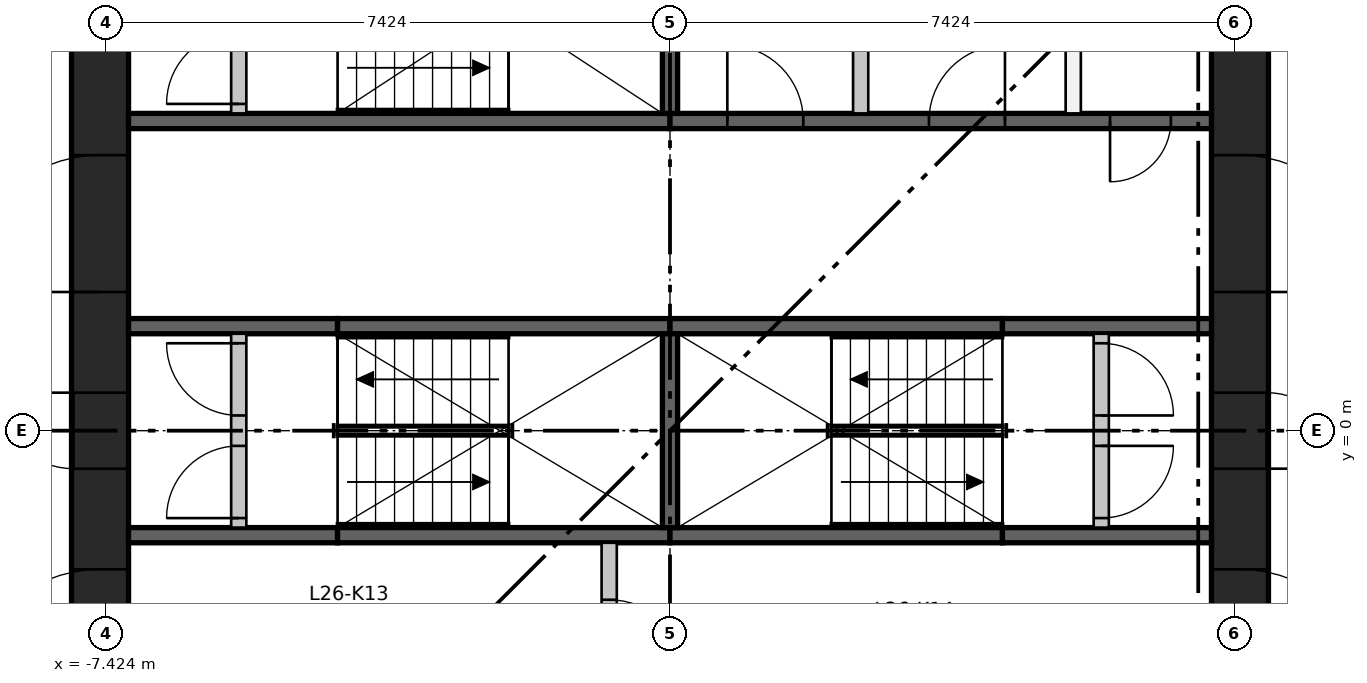
"""IFC4 building model, lengths in metres.
Left out: names, types, materials, properties, quantities, classifications, styles, units other than length and angle.
Written with IfcOpenShell. Run it as: python <this file> out.ifc"""

import sys

from ifc_helpers import new_model, si_unit, direction, frame, frame_2d, origin, place, context, subcontext, project, spatial, rectangle, extrude, element, fill, save


model = new_model("IFC4")
c1 = context("Model", 3, precision=1e-05, world=origin(), true_north=direction((0.0, 1.0)))
c2 = subcontext(c1, "Body", "Model", "MODEL_VIEW")
j1 = project(units=[si_unit("LENGTHUNIT", "METRE"), si_unit("PLANEANGLEUNIT", "RADIAN")], contexts=[c1])
p1 = place(None, origin())
s1 = spatial("IfcSite", under=j1, at=p1, CompositionType="ELEMENT")
p2 = place(p1, origin())
s2 = spatial("IfcBuilding", under=s1, at=p2, CompositionType="ELEMENT")
p3 = place(p2, frame((0.0, 0.0, 101.95)))
s3 = spatial("IfcBuildingStorey", under=s2, at=p3, CompositionType="ELEMENT", Elevation=101.95)
p4 = place(p3, frame((-7.499, -7.124, 0.0), z_axis=(0.0, 0.0, 1.0), x_axis=(0.0, 1.0, 0.0)))
e1 = element("IfcWall", 1, at=p4, inside=s3, PredefinedType="SHEAR", context=c2, shape_type="SweptSolid", body=[
    extrude(rectangle(XDim=14.248, YDim=0.75, at=frame_2d((7.124, 0.0))), origin(), (0.0, 0.0, 1.0), 3.65),
])
p5 = place(p4, frame((6.624, 0.0, 0.0)))
e2 = element("IfcOpeningElement", 2, at=p5, cuts=e1, PredefinedType="OPENING", context=c2, shape_type="SweptSolid", body=[
    extrude(rectangle(XDim=1.0, YDim=2.1, at=frame_2d((0.5, 1.05))), frame((0.0, 0.385, 0.0), z_axis=(0.0, -1.0, 0.0), x_axis=(1.0, 0.0, 0.0)), (0.0, 0.0, 1.0), 0.77),
])
p6 = place(p4, frame((3.5, 0.0, 0.0)))
e3 = element("IfcOpeningElement", 3, at=p6, cuts=e1, PredefinedType="OPENING", context=c2, shape_type="SweptSolid", body=[
    extrude(rectangle(XDim=1.8, YDim=2.1, at=frame_2d((0.9, 1.05))), frame((0.0, 0.385, 0.0), z_axis=(0.0, -1.0, 0.0), x_axis=(1.0, 0.0, 0.0)), (0.0, 0.0, 1.0), 0.77),
])
p7 = place(p4, frame((8.948, 0.0, 0.0)))
e4 = element("IfcOpeningElement", 4, at=p7, cuts=e1, PredefinedType="OPENING", context=c2, shape_type="SweptSolid", body=[
    extrude(rectangle(XDim=1.8, YDim=2.1, at=frame_2d((0.9, 1.05))), frame((0.0, 0.385, 0.0), z_axis=(0.0, -1.0, 0.0), x_axis=(1.0, 0.0, 0.0)), (0.0, 0.0, 1.0), 0.77),
])
p8 = place(p4, frame((12.124, 0.0, 0.0)))
e5 = element("IfcOpeningElement", 5, at=p8, cuts=e1, PredefinedType="OPENING", context=c2, shape_type="SweptSolid", body=[
    extrude(rectangle(XDim=1.0, YDim=2.1, at=frame_2d((0.5, 1.05))), frame((0.0, 0.385, 0.0), z_axis=(0.0, -1.0, 0.0), x_axis=(1.0, 0.0, 0.0)), (0.0, 0.0, 1.0), 0.77),
])
p9 = place(p3, frame((7.499, -7.124, 0.0), z_axis=(0.0, 0.0, 1.0), x_axis=(0.0, 1.0, 0.0)))
e6 = element("IfcWall", 6, at=p9, inside=s3, PredefinedType="SHEAR", context=c2, shape_type="SweptSolid", body=[
    extrude(rectangle(XDim=14.248, YDim=0.75, at=frame_2d((7.124, 0.0))), origin(), (0.0, 0.0, 1.0), 3.65),
])
p10 = place(p9, frame((6.624, 0.0, 0.0)))
e7 = element("IfcOpeningElement", 7, at=p10, cuts=e6, PredefinedType="OPENING", context=c2, shape_type="SweptSolid", body=[
    extrude(rectangle(XDim=1.0, YDim=2.1, at=frame_2d((0.5, 1.05))), frame((0.0, 0.385, 0.0), z_axis=(0.0, -1.0, 0.0), x_axis=(1.0, 0.0, 0.0)), (0.0, 0.0, 1.0), 0.77),
])
p11 = place(p9, frame((3.5, 0.0, 0.0)))
e8 = element("IfcOpeningElement", 8, at=p11, cuts=e6, PredefinedType="OPENING", context=c2, shape_type="SweptSolid", body=[
    extrude(rectangle(XDim=1.8, YDim=2.1, at=frame_2d((0.9, 1.05))), frame((0.0, 0.385, 0.0), z_axis=(0.0, -1.0, 0.0), x_axis=(1.0, 0.0, 0.0)), (0.0, 0.0, 1.0), 0.77),
])
p12 = place(p9, frame((8.948, 0.0, 0.0)))
e9 = element("IfcOpeningElement", 9, at=p12, cuts=e6, PredefinedType="OPENING", context=c2, shape_type="SweptSolid", body=[
    extrude(rectangle(XDim=1.8, YDim=2.1, at=frame_2d((0.9, 1.05))), frame((0.0, 0.385, 0.0), z_axis=(0.0, -1.0, 0.0), x_axis=(1.0, 0.0, 0.0)), (0.0, 0.0, 1.0), 0.77),
])
p13 = place(p3, frame((-7.124, 4.074, 0.0), z_axis=(0.0, 0.0, 1.0), x_axis=(1.0, 0.0, 0.0)))
e10 = element("IfcWall", 10, at=p13, inside=s3, PredefinedType="SHEAR", context=c2, shape_type="SweptSolid", body=[
    extrude(rectangle(XDim=7.124, YDim=0.2, at=frame_2d((3.562, 0.0))), origin(), (0.0, 0.0, 1.0), 3.3),
])
p14 = place(p3, frame((0.0, 4.074, 0.0), z_axis=(0.0, 0.0, 1.0), x_axis=(1.0, 0.0, 0.0)))
e11 = element("IfcWall", 11, at=p14, inside=s3, PredefinedType="SHEAR", context=c2, shape_type="SweptSolid", body=[
    extrude(rectangle(XDim=7.124, YDim=0.2, at=frame_2d((3.562, 0.0))), origin(), (0.0, 0.0, 1.0), 3.3),
])
p15 = place(p14, frame((0.754, 0.0, 0.0)))
e12 = element("IfcOpeningElement", 12, at=p15, cuts=e11, PredefinedType="OPENING", context=c2, shape_type="SweptSolid", body=[
    extrude(rectangle(XDim=1.0, YDim=2.1, at=frame_2d((0.5, 1.05))), frame((0.0, 0.11, 0.0), z_axis=(0.0, -1.0, 0.0), x_axis=(1.0, 0.0, 0.0)), (0.0, 0.0, 1.0), 0.22),
])
p16 = place(p14, frame((3.407, 0.0, 0.0)))
e13 = element("IfcOpeningElement", 13, at=p16, cuts=e11, PredefinedType="OPENING", context=c2, shape_type="SweptSolid", body=[
    extrude(rectangle(XDim=1.0, YDim=2.1, at=frame_2d((0.5, 1.05))), frame((0.0, 0.11, 0.0), z_axis=(0.0, -1.0, 0.0), x_axis=(1.0, 0.0, 0.0)), (0.0, 0.0, 1.0), 0.22),
])
p17 = place(p14, frame((5.79, 0.0, 0.0)))
e14 = element("IfcOpeningElement", 14, at=p17, cuts=e11, PredefinedType="OPENING", context=c2, shape_type="SweptSolid", body=[
    extrude(rectangle(XDim=0.8, YDim=2.1, at=frame_2d((0.4, 1.05))), frame((0.0, 0.11, 0.0), z_axis=(0.0, -1.0, 0.0), x_axis=(1.0, 0.0, 0.0)), (0.0, 0.0, 1.0), 0.22),
])
p18 = place(p3, frame((-7.124, -1.375, 0.0), z_axis=(0.0, 0.0, 1.0), x_axis=(1.0, 0.0, 0.0)))
e15 = element("IfcWall", 15, at=p18, inside=s3, PredefinedType="SHEAR", context=c2, shape_type="SweptSolid", body=[
    extrude(rectangle(XDim=2.75, YDim=0.2, at=frame_2d((1.375, 0.0))), origin(), (0.0, 0.0, 1.0), 3.3),
])
for number, where, z_axis, x_axis in (
    (16, (-4.374, -1.375, 0.0), (0.0, 0.0, 1.0), (1.0, 0.0, 0.0)),
    (17, (0.0, -1.375, 0.0), (0.0, 0.0, 1.0), (1.0, 0.0, 0.0)),
):
    element("IfcWall", number, at=place(p3, frame(where, z_axis=z_axis, x_axis=x_axis)), inside=s3, PredefinedType="SHEAR", context=c2, shape_type="SweptSolid", body=[
        extrude(rectangle(XDim=4.374, YDim=0.2, at=frame_2d((2.187, 0.0))), origin(), (0.0, 0.0, 1.0), 3.3),
    ])
for number, where, z_axis, x_axis in (
    (18, (4.374, -1.375, 0.0), (0.0, 0.0, 1.0), (1.0, 0.0, 0.0)),
    (19, (-7.124, 1.375, 0.0), (0.0, 0.0, 1.0), (1.0, 0.0, 0.0)),
):
    element("IfcWall", number, at=place(p3, frame(where, z_axis=z_axis, x_axis=x_axis)), inside=s3, PredefinedType="SHEAR", context=c2, shape_type="SweptSolid", body=[
        extrude(rectangle(XDim=2.75, YDim=0.2, at=frame_2d((1.375, 0.0))), origin(), (0.0, 0.0, 1.0), 3.3),
    ])
for number, where, z_axis, x_axis in (
    (20, (-4.374, 1.375, 0.0), (0.0, 0.0, 1.0), (1.0, 0.0, 0.0)),
    (21, (0.0, 1.375, 0.0), (0.0, 0.0, 1.0), (1.0, 0.0, 0.0)),
):
    element("IfcWall", number, at=place(p3, frame(where, z_axis=z_axis, x_axis=x_axis)), inside=s3, PredefinedType="SHEAR", context=c2, shape_type="SweptSolid", body=[
        extrude(rectangle(XDim=4.374, YDim=0.2, at=frame_2d((2.187, 0.0))), origin(), (0.0, 0.0, 1.0), 3.3),
    ])
p19 = place(p3, frame((4.374, 1.375, 0.0), z_axis=(0.0, 0.0, 1.0), x_axis=(1.0, 0.0, 0.0)))
e22 = element("IfcWall", 22, at=p19, inside=s3, PredefinedType="SHEAR", context=c2, shape_type="SweptSolid", body=[
    extrude(rectangle(XDim=2.75, YDim=0.2, at=frame_2d((1.375, 0.0))), origin(), (0.0, 0.0, 1.0), 3.3),
])
p20 = place(p3, frame((0.0, -1.275, 0.0), z_axis=(0.0, 0.0, 1.0), x_axis=(0.0, 1.0, 0.0)))
e23 = element("IfcWall", 23, at=p20, inside=s3, PredefinedType="SHEAR", context=c2, shape_type="SweptSolid", body=[
    extrude(rectangle(XDim=2.55, YDim=0.2, at=frame_2d((1.275, 0.0))), origin(), (0.0, 0.0, 1.0), 3.3),
])
p21 = place(p3, frame((-0.8, -3.974, 0.0), z_axis=(0.0, 0.0, 1.0), x_axis=(0.0, 1.0, 0.0)))
e24 = element("IfcWall", 24, at=p21, inside=s3, PredefinedType="PARTITIONING", context=c2, shape_type="SweptSolid", body=[
    extrude(rectangle(XDim=2.499, YDim=0.2, at=frame_2d((1.25, 0.0))), origin(), (0.0, 0.0, 1.0), 3.3),
])
p22 = place(p21, frame((0.75, 0.0, 0.0)))
e25 = element("IfcOpeningElement", 25, at=p22, cuts=e24, PredefinedType="OPENING", context=c2, shape_type="SweptSolid", body=[
    extrude(rectangle(XDim=1.0, YDim=2.1, at=frame_2d((0.5, 1.05))), frame((0.0, 0.11, 0.0), z_axis=(0.0, -1.0, 0.0), x_axis=(1.0, 0.0, 0.0)), (0.0, 0.0, 1.0), 0.22),
])
p23 = place(p3, frame((0.0, 4.174, 0.0), z_axis=(0.0, 0.0, 1.0), x_axis=(0.0, 1.0, 0.0)))
e26 = element("IfcWall", 26, at=p23, inside=s3, PredefinedType="SHEAR", context=c2, shape_type="SweptSolid", body=[
    extrude(rectangle(XDim=1.4, YDim=0.2, at=frame_2d((0.7, 0.0))), origin(), (0.0, 0.0, 1.0), 3.3),
])
for number, where, z_axis, x_axis in (
    (27, (2.509, 4.174, 0.0), (0.0, 0.0, 1.0), (0.0, 1.0, 0.0)),
    (28, (5.305, 4.174, 0.0), (0.0, 0.0, 1.0), (0.0, 1.0, 0.0)),
):
    element("IfcWall", number, at=place(p3, frame(where, z_axis=z_axis, x_axis=x_axis)), inside=s3, PredefinedType="PARTITIONING", context=c2, shape_type="SweptSolid", body=[
        extrude(rectangle(XDim=2.95, YDim=0.2, at=frame_2d((1.475, 0.0))), origin(), (0.0, 0.0, 1.0), 3.3),
    ])
p24 = place(p3, frame((-5.674, -1.275, 0.0), z_axis=(0.0, 0.0, 1.0), x_axis=(0.0, 1.0, 0.0)))
e29 = element("IfcWall", 29, at=p24, inside=s3, PredefinedType="PARTITIONING", context=c2, shape_type="SweptSolid", body=[
    extrude(rectangle(XDim=2.55, YDim=0.2, at=frame_2d((1.275, 0.0))), origin(), (0.0, 0.0, 1.0), 3.3),
])
p25 = place(p24, frame((0.125, 0.0, 0.0)))
e30 = element("IfcOpeningElement", 30, at=p25, cuts=e29, PredefinedType="OPENING", context=c2, shape_type="SweptSolid", body=[
    extrude(rectangle(XDim=0.95, YDim=2.1, at=frame_2d((0.475, 1.05))), frame((0.0, 0.11, 0.0), z_axis=(0.0, -1.0, 0.0), x_axis=(1.0, 0.0, 0.0)), (0.0, 0.0, 1.0), 0.22),
])
p26 = place(p24, frame((1.475, 0.0, 0.0)))
e31 = element("IfcOpeningElement", 31, at=p26, cuts=e29, PredefinedType="OPENING", context=c2, shape_type="SweptSolid", body=[
    extrude(rectangle(XDim=0.95, YDim=2.1, at=frame_2d((0.475, 1.05))), frame((0.0, 0.11, 0.0), z_axis=(0.0, -1.0, 0.0), x_axis=(1.0, 0.0, 0.0)), (0.0, 0.0, 1.0), 0.22),
])
p27 = place(p3, frame((5.674, -1.275, 0.0), z_axis=(0.0, 0.0, 1.0), x_axis=(0.0, 1.0, 0.0)))
e32 = element("IfcWall", 32, at=p27, inside=s3, PredefinedType="PARTITIONING", context=c2, shape_type="SweptSolid", body=[
    extrude(rectangle(XDim=2.55, YDim=0.2, at=frame_2d((1.275, 0.0))), origin(), (0.0, 0.0, 1.0), 3.3),
])
p28 = place(p27, frame((0.125, 0.0, 0.0)))
e33 = element("IfcOpeningElement", 33, at=p28, cuts=e32, PredefinedType="OPENING", context=c2, shape_type="SweptSolid", body=[
    extrude(rectangle(XDim=0.95, YDim=2.1, at=frame_2d((0.475, 1.05))), frame((0.0, 0.11, 0.0), z_axis=(0.0, -1.0, 0.0), x_axis=(1.0, 0.0, 0.0)), (0.0, 0.0, 1.0), 0.22),
])
p29 = place(p27, frame((1.475, 0.0, 0.0)))
e34 = element("IfcOpeningElement", 34, at=p29, cuts=e32, PredefinedType="OPENING", context=c2, shape_type="SweptSolid", body=[
    extrude(rectangle(XDim=0.95, YDim=2.1, at=frame_2d((0.475, 1.05))), frame((0.0, 0.11, 0.0), z_axis=(0.0, -1.0, 0.0), x_axis=(1.0, 0.0, 0.0)), (0.0, 0.0, 1.0), 0.22),
])
p30 = place(p3, frame((-5.674, 4.174, 0.0), z_axis=(0.0, 0.0, 1.0), x_axis=(0.0, 1.0, 0.0)))
e35 = element("IfcWall", 35, at=p30, inside=s3, PredefinedType="PARTITIONING", context=c2, shape_type="SweptSolid", body=[
    extrude(rectangle(XDim=2.95, YDim=0.2, at=frame_2d((1.475, 0.0))), origin(), (0.0, 0.0, 1.0), 3.3),
])
p31 = place(p30, frame((0.125, 0.0, 0.0)))
e36 = element("IfcOpeningElement", 36, at=p31, cuts=e35, PredefinedType="OPENING", context=c2, shape_type="SweptSolid", body=[
    extrude(rectangle(XDim=0.95, YDim=2.1, at=frame_2d((0.475, 1.05))), frame((0.0, 0.11, 0.0), z_axis=(0.0, -1.0, 0.0), x_axis=(1.0, 0.0, 0.0)), (0.0, 0.0, 1.0), 0.22),
])
p32 = place(p30, frame((1.725, 0.0, 0.0)))
e37 = element("IfcOpeningElement", 37, at=p32, cuts=e35, PredefinedType="OPENING", context=c2, shape_type="SweptSolid", body=[
    extrude(rectangle(XDim=0.95, YDim=2.1, at=frame_2d((0.475, 1.05))), frame((0.0, 0.11, 0.0), z_axis=(0.0, -1.0, 0.0), x_axis=(1.0, 0.0, 0.0)), (0.0, 0.0, 1.0), 0.22),
])
p33 = place(p25, origin())
e38 = element("IfcDoor", 38, at=p33, inside=s3, OperationType="SINGLE_SWING_LEFT", PredefinedType="DOOR", context=c2, shape_type="SweptSolid", body=[
    extrude(rectangle(XDim=0.95, YDim=2.1, at=frame_2d((0.475, 1.05))), frame((0.0, 0.025, 0.0), z_axis=(0.0, -1.0, 0.0), x_axis=(1.0, 0.0, 0.0)), (0.0, 0.0, 1.0), 0.05),
])
fill(e30, e38)
p34 = place(p26, origin())
e39 = element("IfcDoor", 39, at=p34, inside=s3, OperationType="SINGLE_SWING_RIGHT", PredefinedType="DOOR", context=c2, shape_type="SweptSolid", body=[
    extrude(rectangle(XDim=0.95, YDim=2.1, at=frame_2d((0.475, 1.05))), frame((0.0, 0.025, 0.0), z_axis=(0.0, -1.0, 0.0), x_axis=(1.0, 0.0, 0.0)), (0.0, 0.0, 1.0), 0.05),
])
fill(e31, e39)
p35 = place(p28, frame((0.95, 0.0, 0.0), z_axis=(0.0, 0.0, 1.0), x_axis=(-1.0, 0.0, 0.0)))
e40 = element("IfcDoor", 40, at=p35, inside=s3, OperationType="SINGLE_SWING_RIGHT", PredefinedType="DOOR", context=c2, shape_type="SweptSolid", body=[
    extrude(rectangle(XDim=0.95, YDim=2.1, at=frame_2d((0.475, 1.05))), frame((0.0, 0.025, 0.0), z_axis=(0.0, -1.0, 0.0), x_axis=(1.0, 0.0, 0.0)), (0.0, 0.0, 1.0), 0.05),
])
fill(e33, e40)
p36 = place(p29, frame((0.95, 0.0, 0.0), z_axis=(0.0, 0.0, 1.0), x_axis=(-1.0, 0.0, 0.0)))
e41 = element("IfcDoor", 41, at=p36, inside=s3, OperationType="SINGLE_SWING_LEFT", PredefinedType="DOOR", context=c2, shape_type="SweptSolid", body=[
    extrude(rectangle(XDim=0.95, YDim=2.1, at=frame_2d((0.475, 1.05))), frame((0.0, 0.025, 0.0), z_axis=(0.0, -1.0, 0.0), x_axis=(1.0, 0.0, 0.0)), (0.0, 0.0, 1.0), 0.05),
])
fill(e34, e41)
p37 = place(p31, origin())
e42 = element("IfcDoor", 42, at=p37, inside=s3, OperationType="SINGLE_SWING_LEFT", PredefinedType="DOOR", context=c2, shape_type="SweptSolid", body=[
    extrude(rectangle(XDim=0.95, YDim=2.1, at=frame_2d((0.475, 1.05))), frame((0.0, 0.025, 0.0), z_axis=(0.0, -1.0, 0.0), x_axis=(1.0, 0.0, 0.0)), (0.0, 0.0, 1.0), 0.05),
])
fill(e36, e42)
p38 = place(p22, frame((1.0, 0.0, 0.0), z_axis=(0.0, 0.0, 1.0), x_axis=(-1.0, 0.0, 0.0)))
e43 = element("IfcDoor", 43, at=p38, inside=s3, OperationType="SINGLE_SWING_LEFT", PredefinedType="DOOR", context=c2, shape_type="SweptSolid", body=[
    extrude(rectangle(XDim=1.0, YDim=2.1, at=frame_2d((0.5, 1.05))), frame((0.0, 0.025, 0.0), z_axis=(0.0, -1.0, 0.0), x_axis=(1.0, 0.0, 0.0)), (0.0, 0.0, 1.0), 0.05),
])
fill(e25, e43)
p39 = place(p15, origin())
e44 = element("IfcDoor", 44, at=p39, inside=s3, OperationType="SINGLE_SWING_LEFT", PredefinedType="DOOR", context=c2, shape_type="SweptSolid", body=[
    extrude(rectangle(XDim=1.0, YDim=2.1, at=frame_2d((0.5, 1.05))), frame((0.0, 0.025, 0.0), z_axis=(0.0, -1.0, 0.0), x_axis=(1.0, 0.0, 0.0)), (0.0, 0.0, 1.0), 0.05),
])
fill(e12, e44)
p40 = place(p16, origin())
e45 = element("IfcDoor", 45, at=p40, inside=s3, OperationType="SINGLE_SWING_RIGHT", PredefinedType="DOOR", context=c2, shape_type="SweptSolid", body=[
    extrude(rectangle(XDim=1.0, YDim=2.1, at=frame_2d((0.5, 1.05))), frame((0.0, 0.025, 0.0), z_axis=(0.0, -1.0, 0.0), x_axis=(1.0, 0.0, 0.0)), (0.0, 0.0, 1.0), 0.05),
])
fill(e13, e45)
p41 = place(p17, frame((0.8, 0.0, 0.0), z_axis=(0.0, 0.0, 1.0), x_axis=(-1.0, 0.0, 0.0)))
e46 = element("IfcDoor", 46, at=p41, inside=s3, OperationType="SINGLE_SWING_LEFT", PredefinedType="DOOR", context=c2, shape_type="SweptSolid", body=[
    extrude(rectangle(XDim=0.8, YDim=2.1, at=frame_2d((0.4, 1.05))), frame((0.0, 0.025, 0.0), z_axis=(0.0, -1.0, 0.0), x_axis=(1.0, 0.0, 0.0)), (0.0, 0.0, 1.0), 0.05),
])
fill(e14, e46)
p42 = place(p5, origin())
e47 = element("IfcDoor", 47, at=p42, inside=s3, OperationType="SINGLE_SWING_RIGHT", PredefinedType="DOOR", context=c2, shape_type="SweptSolid", body=[
    extrude(rectangle(XDim=1.0, YDim=2.1, at=frame_2d((0.5, 1.05))), frame((0.0, 0.375, 0.0), z_axis=(0.0, -1.0, 0.0), x_axis=(1.0, 0.0, 0.0)), (0.0, 0.0, 1.0), 0.05),
])
fill(e2, e47)
p43 = place(p6, origin())
e48 = element("IfcDoor", 48, at=p43, inside=s3, OperationType="DOUBLE_DOOR_SINGLE_SWING", PredefinedType="DOOR", context=c2, shape_type="SweptSolid", body=[
    extrude(rectangle(XDim=1.8, YDim=2.1, at=frame_2d((0.9, 1.05))), frame((0.0, 0.025, 0.0), z_axis=(0.0, -1.0, 0.0), x_axis=(1.0, 0.0, 0.0)), (0.0, 0.0, 1.0), 0.05),
])
fill(e3, e48)
p44 = place(p7, origin())
e49 = element("IfcDoor", 49, at=p44, inside=s3, OperationType="DOUBLE_DOOR_SINGLE_SWING", PredefinedType="DOOR", context=c2, shape_type="SweptSolid", body=[
    extrude(rectangle(XDim=1.8, YDim=2.1, at=frame_2d((0.9, 1.05))), frame((0.0, 0.025, 0.0), z_axis=(0.0, -1.0, 0.0), x_axis=(1.0, 0.0, 0.0)), (0.0, 0.0, 1.0), 0.05),
])
fill(e4, e49)
p45 = place(p10, frame((1.0, 0.0, 0.0), z_axis=(0.0, 0.0, 1.0), x_axis=(-1.0, 0.0, 0.0)))
e50 = element("IfcDoor", 50, at=p45, inside=s3, OperationType="SINGLE_SWING_LEFT", PredefinedType="DOOR", context=c2, shape_type="SweptSolid", body=[
    extrude(rectangle(XDim=1.0, YDim=2.1, at=frame_2d((0.5, 1.05))), frame((0.0, 0.375, 0.0), z_axis=(0.0, -1.0, 0.0), x_axis=(1.0, 0.0, 0.0)), (0.0, 0.0, 1.0), 0.05),
])
fill(e7, e50)
p46 = place(p11, frame((1.8, 0.0, 0.0), z_axis=(0.0, 0.0, 1.0), x_axis=(-1.0, 0.0, 0.0)))
e51 = element("IfcDoor", 51, at=p46, inside=s3, OperationType="DOUBLE_DOOR_SINGLE_SWING", PredefinedType="DOOR", context=c2, shape_type="SweptSolid", body=[
    extrude(rectangle(XDim=1.8, YDim=2.1, at=frame_2d((0.9, 1.05))), frame((0.0, 0.025, 0.0), z_axis=(0.0, -1.0, 0.0), x_axis=(1.0, 0.0, 0.0)), (0.0, 0.0, 1.0), 0.05),
])
fill(e8, e51)
p47 = place(p12, frame((1.8, 0.0, 0.0), z_axis=(0.0, 0.0, 1.0), x_axis=(-1.0, 0.0, 0.0)))
e52 = element("IfcDoor", 52, at=p47, inside=s3, OperationType="DOUBLE_DOOR_SINGLE_SWING", PredefinedType="DOOR", context=c2, shape_type="SweptSolid", body=[
    extrude(rectangle(XDim=1.8, YDim=2.1, at=frame_2d((0.9, 1.05))), frame((0.0, 0.025, 0.0), z_axis=(0.0, -1.0, 0.0), x_axis=(1.0, 0.0, 0.0)), (0.0, 0.0, 1.0), 0.05),
])
fill(e9, e52)
save(model, sys.argv[1])
